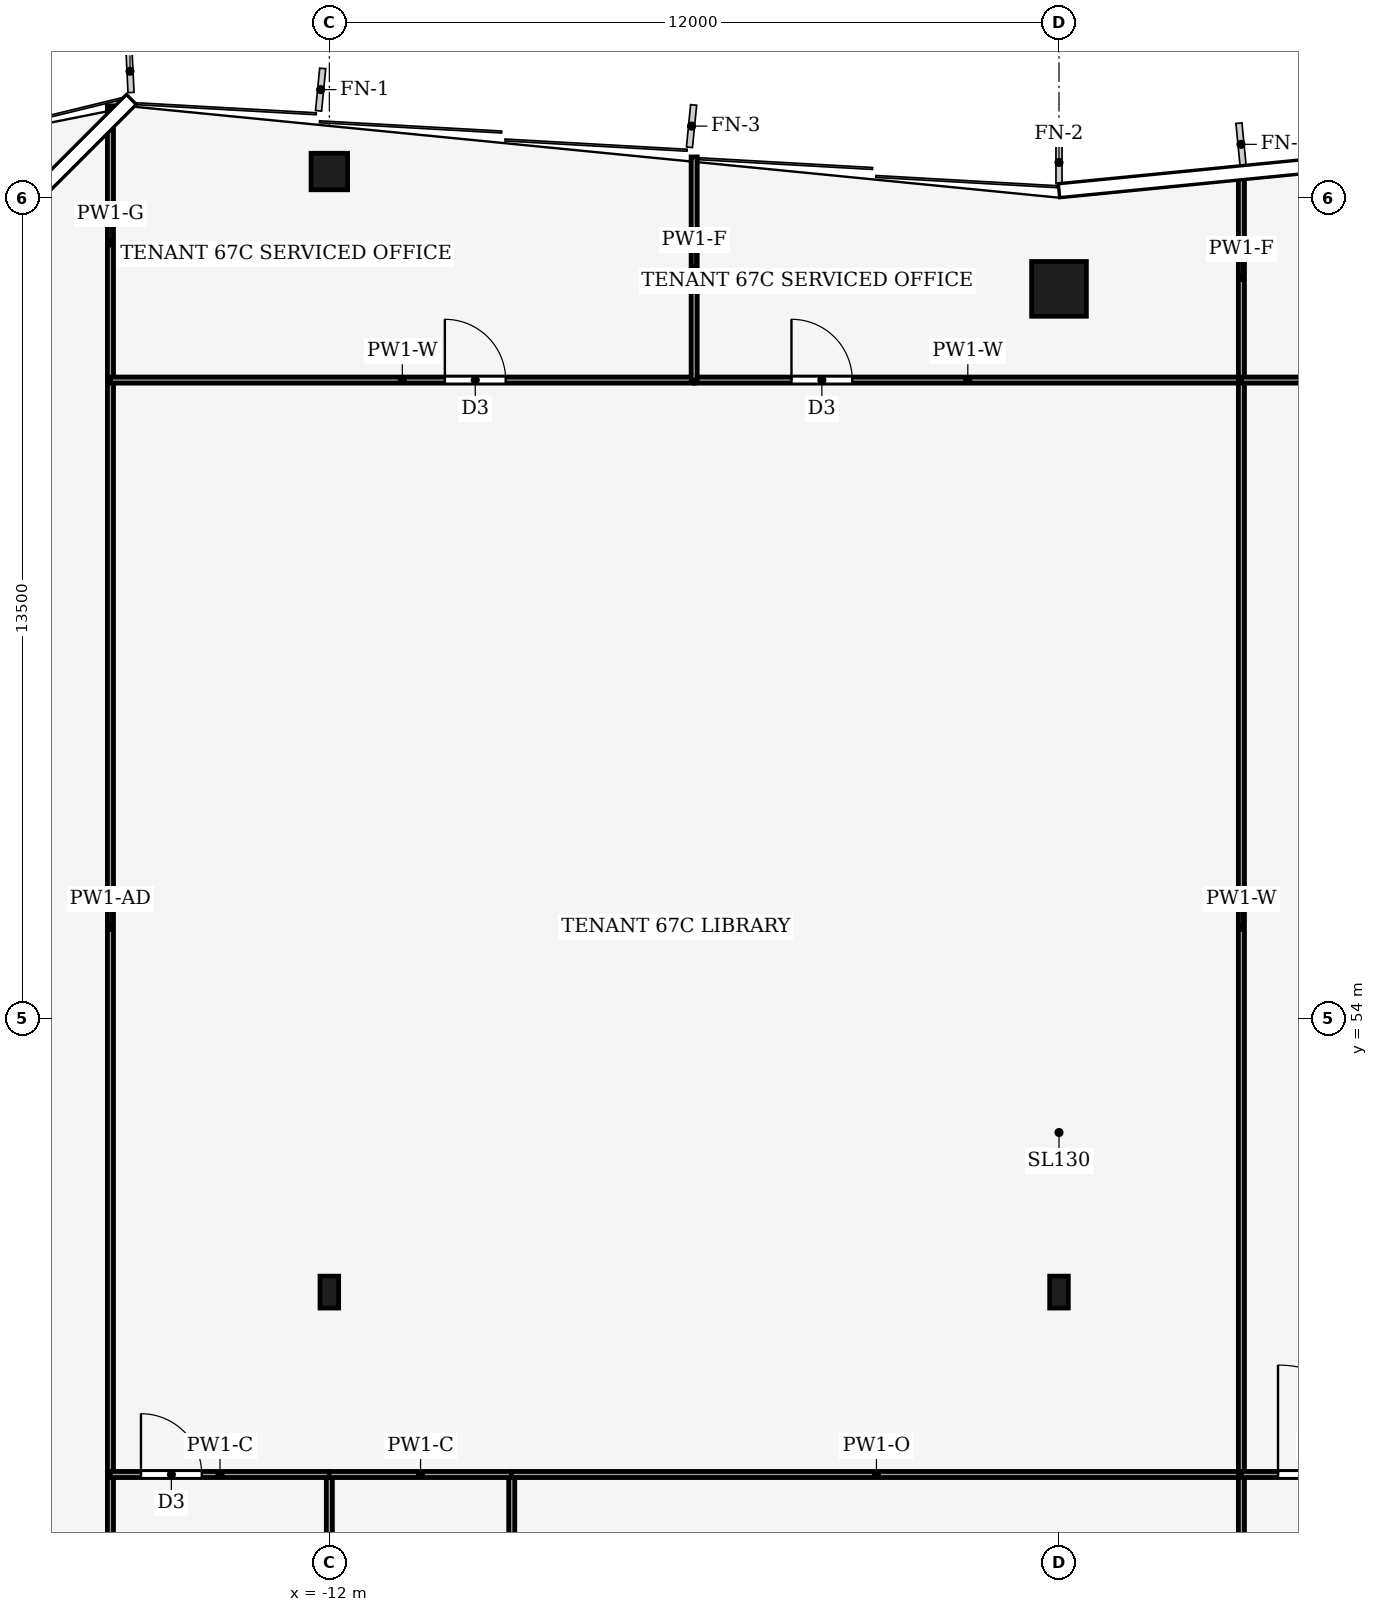
"""IFC4 building model, lengths in metres.
Left out: names, types, materials, properties, quantities, classifications, styles, units other than length and angle.
Written with IfcOpenShell. Run it as: python <this file> out.ifc"""

import sys

from ifc_helpers import new_model, si_unit, direction, frame, frame_2d, origin, origin_2d, place, context, subcontext, project, spatial, rectangle, hollow_rectangle, i_section, extrude, element, fill, save


model = new_model("IFC4")
c1 = context("Model", 3, precision=1e-05, world=origin(), true_north=direction((0.0, 1.0)))
c2 = subcontext(c1, "Body", "Model", "MODEL_VIEW")
j1 = project(units=[si_unit("LENGTHUNIT", "METRE"), si_unit("PLANEANGLEUNIT", "RADIAN")], contexts=[c1])
p1 = place(None, origin())
s1 = spatial("IfcSite", under=j1, at=p1, CompositionType="ELEMENT")
p2 = place(p1, origin())
s2 = spatial("IfcBuilding", under=s1, at=p2, CompositionType="ELEMENT")
p3 = place(p2, frame((0.0, 0.0, 294.0)))
s3 = spatial("IfcBuildingStorey", under=s2, at=p3, CompositionType="ELEMENT", Elevation=294.0)
p4 = place(p3, frame((0.0, 66.0, 0.0), z_axis=(0.0, 0.0, 1.0), x_axis=(1.0, 0.0, 0.0)))
e1 = element("IfcColumn", 1, at=p4, inside=s3, PredefinedType="COLUMN", context=c2, shape_type="SweptSolid", body=[
    extrude(hollow_rectangle(XDim=0.9, YDim=0.9, WallThickness=0.04, at=origin_2d()), origin(), (0.0, 0.0, 1.0), 4.0),
])
p5 = place(p3, frame((-12.0, 67.93, 0.0), z_axis=(0.0, 0.0, 1.0), x_axis=(1.0, 0.0, 0.0)))
e2 = element("IfcColumn", 2, at=p5, inside=s3, PredefinedType="COLUMN", context=c2, shape_type="SweptSolid", body=[
    extrude(hollow_rectangle(XDim=0.6, YDim=0.6, WallThickness=0.025, at=origin_2d()), origin(), (0.0, 0.0, 1.0), 4.0),
])
for number, where, z_axis, x_axis in (
    (3, (-12.0, 49.5, 0.0), (0.0, 0.0, 1.0), (1.0, 0.0, 0.0)),
    (4, (0.0, 49.5, 0.0), (0.0, 0.0, 1.0), (1.0, 0.0, 0.0)),
):
    element("IfcColumn", number, at=place(p3, frame(where, z_axis=z_axis, x_axis=x_axis)), inside=s3, PredefinedType="COLUMN", context=c2, shape_type="SweptSolid", body=[
        extrude(i_section(OverallWidth=0.306, OverallDepth=0.524, WebThickness=0.012, FlangeThickness=0.04, FilletRadius=0.027, at=origin_2d()), origin(), (0.0, 0.0, 1.0), 4.0),
    ])
p6 = place(p3, frame((-15.6, 40.6, 0.0), z_axis=(0.0, 0.0, 1.0), x_axis=(0.0, 1.0, 0.0)))
e5 = element("IfcWall", 5, at=p6, inside=s3, PredefinedType="PARTITIONING", context=c2, shape_type="SweptSolid", body=[
    extrude(rectangle(XDim=5.9, YDim=0.1, at=frame_2d((2.95, 0.0))), origin(), (0.0, 0.0, 1.0), 3.87),
])
p7 = place(p3, frame((-15.6, 46.5, 0.0), z_axis=(0.0, 0.0, 1.0), x_axis=(0.0, 1.0, 0.0)))
e6 = element("IfcWall", 6, at=p7, inside=s3, PredefinedType="PARTITIONING", context=c2, shape_type="SweptSolid", body=[
    extrude(rectangle(XDim=18.0, YDim=0.1, at=frame_2d((9.0, 0.0))), origin(), (0.0, 0.0, 1.0), 3.35),
])
p8 = place(p3, frame((-15.6, 64.5, 0.0), z_axis=(0.0, 0.0, 1.0), x_axis=(0.0, 1.0, 0.0)))
e7 = element("IfcWall", 7, at=p8, inside=s3, PredefinedType="PARTITIONING", context=c2, shape_type="SweptSolid", body=[
    extrude(rectangle(XDim=4.51, YDim=0.1, at=frame_2d((2.255, 0.0))), origin(), (0.0, 0.0, 1.0), 2.93),
])
p9 = place(p3, frame((-12.0, 46.5, 0.0), z_axis=(0.0, 0.0, 1.0), x_axis=(0.0, -1.0, 0.0)))
e8 = element("IfcWall", 8, at=p9, inside=s3, PredefinedType="PARTITIONING", context=c2, shape_type="SweptSolid", body=[
    extrude(rectangle(XDim=5.9, YDim=0.1, at=frame_2d((2.95, 0.0))), origin(), (0.0, 0.0, 1.0), 3.39),
])
p10 = place(p9, frame((2.45, 0.0, 0.0)))
e9 = element("IfcOpeningElement", 9, at=p10, cuts=e8, PredefinedType="OPENING", context=c2, shape_type="SweptSolid", body=[
    extrude(rectangle(XDim=1.0, YDim=2.1, at=frame_2d((0.5, 1.05))), frame((0.0, 0.06, 0.0), z_axis=(0.0, -1.0, 0.0), x_axis=(1.0, 0.0, 0.0)), (0.0, 0.0, 1.0), 0.12),
])
p11 = place(p3, frame((-15.6, 46.5, 0.0), z_axis=(0.0, 0.0, 1.0), x_axis=(1.0, 0.0, 0.0)))
e10 = element("IfcWall", 10, at=p11, inside=s3, PredefinedType="PARTITIONING", context=c2, shape_type="SweptSolid", body=[
    extrude(rectangle(XDim=3.604, YDim=0.1, at=frame_2d((1.802, 0.0))), origin(), (0.0, 0.0, 1.0), 3.87),
])
p12 = place(p11, frame((0.502, 0.0, 0.0)))
e11 = element("IfcOpeningElement", 11, at=p12, cuts=e10, PredefinedType="OPENING", context=c2, shape_type="SweptSolid", body=[
    extrude(rectangle(XDim=1.0, YDim=2.1, at=frame_2d((0.5, 1.05))), frame((0.0, 0.06, 0.0), z_axis=(0.0, -1.0, 0.0), x_axis=(1.0, 0.0, 0.0)), (0.0, 0.0, 1.0), 0.12),
])
p13 = place(p3, frame((-9.0, 40.6, 0.0), z_axis=(0.0, 0.0, 1.0), x_axis=(0.0, 1.0, 0.0)))
e12 = element("IfcWall", 12, at=p13, inside=s3, PredefinedType="PARTITIONING", context=c2, shape_type="SweptSolid", body=[
    extrude(rectangle(XDim=5.9, YDim=0.1, at=frame_2d((2.95, 0.0))), origin(), (0.0, 0.0, 1.0), 3.87),
])
p14 = place(p3, frame((-8.996, 46.5, 0.0), z_axis=(0.0, 0.0, 1.0), x_axis=(-1.0, 0.0, 0.0)))
e13 = element("IfcWall", 13, at=p14, inside=s3, PredefinedType="PARTITIONING", context=c2, shape_type="SweptSolid", body=[
    extrude(rectangle(XDim=3.008, YDim=0.1, at=frame_2d((1.504, 0.0))), origin(), (0.0, 0.0, 1.0), 3.87),
])
p15 = place(p3, frame((3.0, 46.5, 0.0), z_axis=(0.0, 0.0, 1.0), x_axis=(-1.0, 0.0, 0.0)))
e14 = element("IfcWall", 14, at=p15, inside=s3, PredefinedType="PARTITIONING", context=c2, shape_type="SweptSolid", body=[
    extrude(rectangle(XDim=12.004, YDim=0.1, at=frame_2d((6.002, 0.0))), origin(), (0.0, 0.0, 1.0), 3.39),
])
p16 = place(p3, frame((3.0, 40.6, 0.0), z_axis=(0.0, 0.0, 1.0), x_axis=(0.0, 1.0, 0.0)))
e15 = element("IfcWall", 15, at=p16, inside=s3, PredefinedType="PARTITIONING", context=c2, shape_type="SweptSolid", body=[
    extrude(rectangle(XDim=5.9, YDim=0.1, at=frame_2d((2.95, 0.0))), origin(), (0.0, 0.0, 1.0), 3.87),
])
p17 = place(p3, frame((-15.6, 64.5, 0.0), z_axis=(0.0, 0.0, 1.0), x_axis=(1.0, 0.0, 0.0)))
e16 = element("IfcWall", 16, at=p17, inside=s3, PredefinedType="PARTITIONING", context=c2, shape_type="SweptSolid", body=[
    extrude(rectangle(XDim=9.6, YDim=0.1, at=frame_2d((4.8, 0.0))), origin(), (0.0, 0.0, 1.0), 3.24),
])
p18 = place(p17, frame((5.5, 0.0, 0.0)))
e17 = element("IfcOpeningElement", 17, at=p18, cuts=e16, PredefinedType="OPENING", context=c2, shape_type="SweptSolid", body=[
    extrude(rectangle(XDim=1.0, YDim=2.1, at=frame_2d((0.5, 1.05))), frame((0.0, 0.06, 0.0), z_axis=(0.0, -1.0, 0.0), x_axis=(1.0, 0.0, 0.0)), (0.0, 0.0, 1.0), 0.12),
])
p19 = place(p3, frame((-6.0, 64.5, 0.0), z_axis=(0.0, 0.0, 1.0), x_axis=(1.0, 0.0, 0.0)))
e18 = element("IfcWall", 18, at=p19, inside=s3, PredefinedType="PARTITIONING", context=c2, shape_type="SweptSolid", body=[
    extrude(rectangle(XDim=9.0, YDim=0.1, at=frame_2d((4.5, 0.0))), origin(), (0.0, 0.0, 1.0), 3.24),
])
p20 = place(p19, frame((1.6, 0.0, 0.0)))
e19 = element("IfcOpeningElement", 19, at=p20, cuts=e18, PredefinedType="OPENING", context=c2, shape_type="SweptSolid", body=[
    extrude(rectangle(XDim=1.0, YDim=2.1, at=frame_2d((0.5, 1.05))), frame((0.0, 0.06, 0.0), z_axis=(0.0, -1.0, 0.0), x_axis=(1.0, 0.0, 0.0)), (0.0, 0.0, 1.0), 0.12),
])
p21 = place(p3, frame((3.0, 46.5, 0.0), z_axis=(0.0, 0.0, 1.0), x_axis=(0.0, 1.0, 0.0)))
e20 = element("IfcWall", 20, at=p21, inside=s3, PredefinedType="PARTITIONING", context=c2, shape_type="SweptSolid", body=[
    extrude(rectangle(XDim=18.0, YDim=0.1, at=frame_2d((9.0, 0.0))), origin(), (0.0, 0.0, 1.0), 3.24),
])
p22 = place(p3, frame((-6.0, 64.5, 0.0), z_axis=(0.0, 0.0, 1.0), x_axis=(0.0, 1.0, 0.0)))
e21 = element("IfcWall", 21, at=p22, inside=s3, PredefinedType="PARTITIONING", context=c2, shape_type="SweptSolid", body=[
    extrude(rectangle(XDim=3.67, YDim=0.1, at=frame_2d((1.835, 0.0))), origin(), (0.0, 0.0, 1.0), 3.04),
])
p23 = place(p3, frame((3.0, 64.5, 0.0), z_axis=(0.0, 0.0, 1.0), x_axis=(0.0, 1.0, 0.0)))
e22 = element("IfcWall", 22, at=p23, inside=s3, PredefinedType="PARTITIONING", context=c2, shape_type="SweptSolid", body=[
    extrude(rectangle(XDim=3.375, YDim=0.1, at=frame_2d((1.688, 0.0))), origin(), (0.0, 0.0, 1.0), 3.04),
])
p24 = place(p3, frame((3.0, 46.5, 0.0), z_axis=(0.0, 0.0, 1.0), x_axis=(1.0, 0.0, 0.0)))
e23 = element("IfcWall", 23, at=p24, inside=s3, PredefinedType="PARTITIONING", context=c2, shape_type="SweptSolid", body=[
    extrude(rectangle(XDim=3.004, YDim=0.1, at=frame_2d((1.502, 0.0))), origin(), (0.0, 0.0, 1.0), 3.39),
])
p25 = place(p24, frame((0.602, 0.0, 0.0)))
e24 = element("IfcOpeningElement", 24, at=p25, cuts=e23, PredefinedType="OPENING", context=c2, shape_type="SweptSolid", body=[
    extrude(rectangle(XDim=1.8, YDim=2.1, at=frame_2d((0.9, 1.05))), frame((0.0, 0.06, 0.0), z_axis=(0.0, -1.0, 0.0), x_axis=(1.0, 0.0, 0.0)), (0.0, 0.0, 1.0), 0.12),
])
p26 = place(p3, frame((3.0, 64.5, 0.0), z_axis=(0.0, 0.0, 1.0), x_axis=(1.0, 0.0, 0.0)))
e25 = element("IfcWall", 25, at=p26, inside=s3, PredefinedType="PARTITIONING", context=c2, shape_type="SweptSolid", body=[
    extrude(rectangle(XDim=12.6, YDim=0.1, at=frame_2d((6.3, 0.0))), origin(), (0.0, 0.0, 1.0), 3.24),
])
p27 = place(p26, frame((5.8, 0.0, 0.0)))
e26 = element("IfcOpeningElement", 26, at=p27, cuts=e25, PredefinedType="OPENING", context=c2, shape_type="SweptSolid", body=[
    extrude(rectangle(XDim=1.0, YDim=2.1, at=frame_2d((0.5, 1.05))), frame((0.0, 0.06, 0.0), z_axis=(0.0, -1.0, 0.0), x_axis=(1.0, 0.0, 0.0)), (0.0, 0.0, 1.0), 0.12),
])
p28 = place(p12, origin())
e27 = element("IfcDoor", 27, at=p28, inside=s3, OperationType="SINGLE_SWING_LEFT", PredefinedType="DOOR", context=c2, shape_type="SweptSolid", body=[
    extrude(rectangle(XDim=1.0, YDim=2.1, at=frame_2d((0.5, 1.05))), frame((0.0, 0.025, 0.0), z_axis=(0.0, -1.0, 0.0), x_axis=(1.0, 0.0, 0.0)), (0.0, 0.0, 1.0), 0.05),
])
fill(e11, e27)
p29 = place(p18, origin())
e28 = element("IfcDoor", 28, at=p29, inside=s3, OperationType="SINGLE_SWING_RIGHT", PredefinedType="DOOR", context=c2, shape_type="SweptSolid", body=[
    extrude(rectangle(XDim=1.0, YDim=2.1, at=frame_2d((0.5, 1.05))), frame((0.0, 0.025, 0.0), z_axis=(0.0, -1.0, 0.0), x_axis=(1.0, 0.0, 0.0)), (0.0, 0.0, 1.0), 0.05),
])
fill(e17, e28)
p30 = place(p20, origin())
e29 = element("IfcDoor", 29, at=p30, inside=s3, OperationType="SINGLE_SWING_LEFT", PredefinedType="DOOR", context=c2, shape_type="SweptSolid", body=[
    extrude(rectangle(XDim=1.0, YDim=2.1, at=frame_2d((0.5, 1.05))), frame((0.0, 0.025, 0.0), z_axis=(0.0, -1.0, 0.0), x_axis=(1.0, 0.0, 0.0)), (0.0, 0.0, 1.0), 0.05),
])
fill(e19, e29)
p31 = place(p25, origin())
e30 = element("IfcDoor", 30, at=p31, inside=s3, OperationType="DOUBLE_DOOR_SINGLE_SWING", PredefinedType="DOOR", context=c2, shape_type="SweptSolid", body=[
    extrude(rectangle(XDim=1.8, YDim=2.1, at=frame_2d((0.9, 1.05))), frame((0.0, 0.025, 0.0), z_axis=(0.0, -1.0, 0.0), x_axis=(1.0, 0.0, 0.0)), (0.0, 0.0, 1.0), 0.05),
])
fill(e24, e30)
save(model, sys.argv[1])
